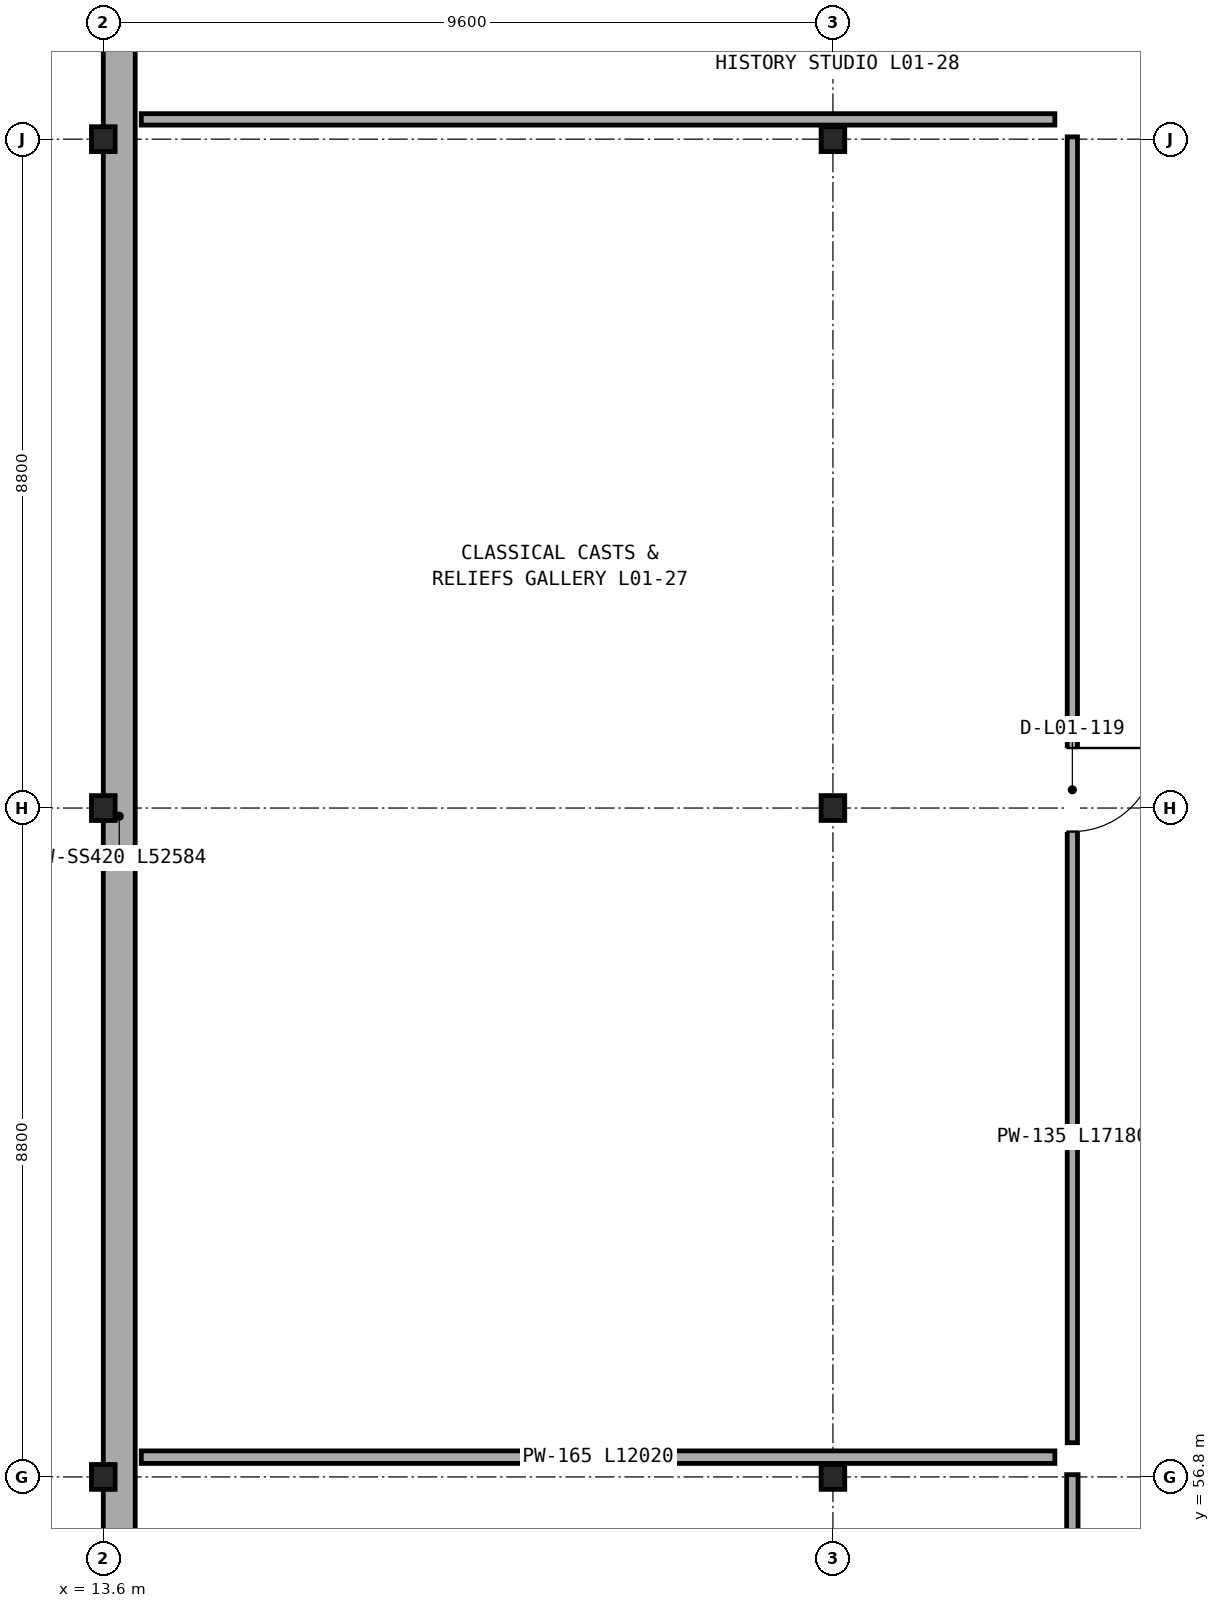
"""IFC4 building model, lengths in metres.
Left out: names, types, materials, properties, quantities, classifications, styles, units other than length and angle.
Written with IfcOpenShell. Run it as: python <this file> out.ifc"""

import sys

from ifc_helpers import new_model, si_unit, direction, frame, frame_2d, origin, origin_2d, place, context, subcontext, project, spatial, rectangle, i_section, extrude, element, fill, save


model = new_model("IFC4")
c1 = context("Model", 3, precision=1e-05, world=origin(), true_north=direction((0.0, 1.0)))
c2 = subcontext(c1, "Body", "Model", "MODEL_VIEW")
j1 = project(units=[si_unit("LENGTHUNIT", "METRE"), si_unit("PLANEANGLEUNIT", "RADIAN")], contexts=[c1])
p1 = place(None, origin())
s1 = spatial("IfcSite", under=j1, at=p1, CompositionType="ELEMENT")
p2 = place(p1, origin())
s2 = spatial("IfcBuilding", under=s1, at=p2, CompositionType="ELEMENT")
p3 = place(p2, frame((0.0, 0.0, 5.6)))
s3 = spatial("IfcBuildingStorey", under=s2, at=p3, CompositionType="ELEMENT", Elevation=5.6)
for number, where, z_axis, x_axis in (
    (1, (13.6, 56.8, 0.0), (0.0, 0.0, 1.0), (1.0, 0.0, 0.0)),
    (2, (13.6, 65.6, 0.0), (0.0, 0.0, 1.0), (1.0, 0.0, 0.0)),
    (3, (13.6, 74.4, 0.0), (0.0, 0.0, 1.0), (1.0, 0.0, 0.0)),
    (4, (23.2, 56.8, 0.0), (0.0, 0.0, 1.0), (1.0, 0.0, 0.0)),
    (5, (23.2, 65.6, 0.0), (0.0, 0.0, 1.0), (1.0, 0.0, 0.0)),
    (6, (23.2, 74.4, 0.0), (0.0, 0.0, 1.0), (1.0, 0.0, 0.0)),
):
    element("IfcColumn", number, at=place(p3, frame(where, z_axis=z_axis, x_axis=x_axis)), inside=s3, PredefinedType="COLUMN", context=c2, shape_type="SweptSolid", body=[
        extrude(i_section(OverallWidth=0.311, OverallDepth=0.327, WebThickness=0.016, FlangeThickness=0.025, FilletRadius=0.017, at=origin_2d()), origin(), (0.0, 0.0, 1.0), 4.5),
    ])
p4 = place(p3, frame((13.81, 91.784, 0.0), z_axis=(0.0, 0.0, 1.0), x_axis=(0.0, -1.0, 0.0)))
e7 = element("IfcWall", 7, at=p4, inside=s3, PredefinedType="SOLIDWALL", context=c2, shape_type="SweptSolid", body=[
    extrude(rectangle(XDim=52.584, YDim=0.42, at=frame_2d((26.292, 0.0))), origin(), (0.0, 0.0, 1.0), 3.205),
])
p5 = place(p3, frame((26.35, 56.83, 0.0), z_axis=(0.0, 0.0, 1.0), x_axis=(0.0, -1.0, 0.0)))
e8 = element("IfcWall", 8, at=p5, inside=s3, PredefinedType="PARTITIONING", context=c2, shape_type="SweptSolid", body=[
    extrude(rectangle(XDim=2.35, YDim=0.15, at=frame_2d((1.175, 0.0))), origin(), (0.0, 0.0, 1.0), 3.19),
])
p6 = place(p3, frame((26.35, 74.43, 0.0), z_axis=(0.0, 0.0, 1.0), x_axis=(0.0, -1.0, 0.0)))
e9 = element("IfcWall", 9, at=p6, inside=s3, PredefinedType="PARTITIONING", context=c2, shape_type="SweptSolid", body=[
    extrude(rectangle(XDim=17.18, YDim=0.135, at=frame_2d((8.59, 0.0))), origin(), (0.0, 0.0, 1.0), 3.19),
])
p7 = place(p6, frame((8.04, 0.0, 0.0)))
e10 = element("IfcOpeningElement", 10, at=p7, cuts=e9, PredefinedType="OPENING", context=c2, shape_type="SweptSolid", body=[
    extrude(rectangle(XDim=1.1, YDim=2.08, at=frame_2d((0.55, 1.04))), frame((0.0, 0.078, 0.0), z_axis=(0.0, -1.0, 0.0), x_axis=(1.0, 0.0, 0.0)), (0.0, 0.0, 1.0), 0.155),
])
p8 = place(p3, frame((14.1, 57.06, 0.0), z_axis=(0.0, 0.0, 1.0), x_axis=(1.0, 0.0, 0.0)))
e11 = element("IfcWall", 11, at=p8, inside=s3, PredefinedType="PARTITIONING", context=c2, shape_type="SweptSolid", body=[
    extrude(rectangle(XDim=12.02, YDim=0.165, at=frame_2d((6.01, 0.0))), origin(), (0.0, 0.0, 1.0), 3.19),
])
p9 = place(p3, frame((14.1, 74.66, 0.0), z_axis=(0.0, 0.0, 1.0), x_axis=(1.0, 0.0, 0.0)))
e12 = element("IfcWall", 12, at=p9, inside=s3, PredefinedType="PARTITIONING", context=c2, shape_type="SweptSolid", body=[
    extrude(rectangle(XDim=12.02, YDim=0.15, at=frame_2d((6.01, 0.0))), origin(), (0.0, 0.0, 1.0), 3.19),
])
p10 = place(p7, origin())
e13 = element("IfcDoor", 13, at=p10, inside=s3, OperationType="SINGLE_SWING_LEFT", PredefinedType="DOOR", context=c2, shape_type="SweptSolid", body=[
    extrude(rectangle(XDim=1.1, YDim=2.08, at=frame_2d((0.55, 1.04))), frame((0.0, 0.025, 0.0), z_axis=(0.0, -1.0, 0.0), x_axis=(1.0, 0.0, 0.0)), (0.0, 0.0, 1.0), 0.05),
])
fill(e10, e13)
save(model, sys.argv[1])
